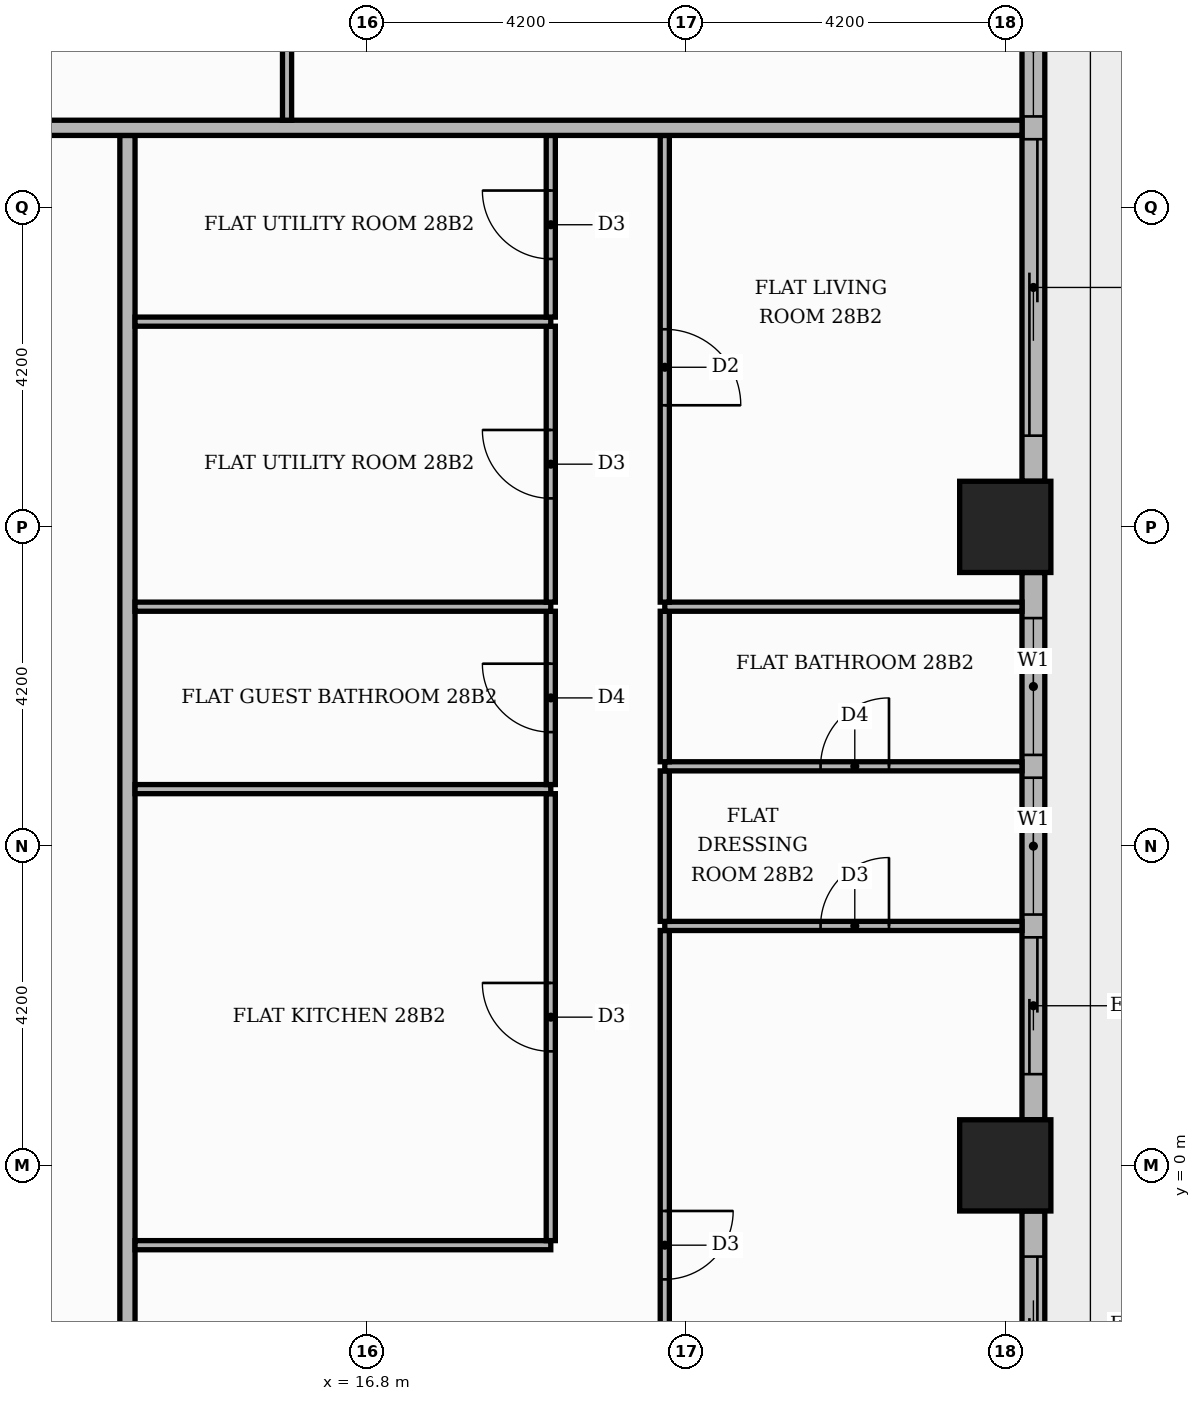
"""IFC4 building model, lengths in metres.
Left out: names, types, materials, properties, quantities, classifications, styles, units other than length and angle.
Written with IfcOpenShell. Run it as: python <this file> out.ifc"""

import sys

from ifc_helpers import new_model, si_unit, direction, frame, frame_2d, origin, origin_2d, place, context, subcontext, project, spatial, rectangle, extrude, element, fill, save


model = new_model("IFC4")
c1 = context("Model", 3, precision=1e-05, world=origin(), true_north=direction((0.0, 1.0)))
c2 = subcontext(c1, "Body", "Model", "MODEL_VIEW")
j1 = project(units=[si_unit("LENGTHUNIT", "METRE"), si_unit("PLANEANGLEUNIT", "RADIAN")], contexts=[c1])
p1 = place(None, origin())
s1 = spatial("IfcSite", under=j1, at=p1, CompositionType="ELEMENT")
p2 = place(p1, origin())
s2 = spatial("IfcBuilding", under=s1, at=p2, CompositionType="ELEMENT")
p3 = place(p2, frame((0.0, 0.0, 118.2)))
s3 = spatial("IfcBuildingStorey", under=s2, at=p3, CompositionType="ELEMENT", Elevation=118.2)
for number, where, z_axis, x_axis in (
    (1, (25.2, 0.0, 0.0), (0.0, 0.0, 1.0), (1.0, 0.0, 0.0)),
    (2, (25.2, 8.4, 0.0), (0.0, 0.0, 1.0), (1.0, 0.0, 0.0)),
):
    element("IfcColumn", number, at=place(p3, frame(where, z_axis=z_axis, x_axis=x_axis)), inside=s3, PredefinedType="COLUMN", context=c2, shape_type="SweptSolid", body=[
        extrude(rectangle(XDim=1.2, YDim=1.2, at=origin_2d()), origin(), (0.0, 0.0, 1.0), 3.9),
    ])
p4 = place(p3, frame((25.57, -7.8, 0.0), z_axis=(0.0, 0.0, 1.0), x_axis=(0.0, 1.0, 0.0)))
e3 = element("IfcWall", 3, at=p4, inside=s3, PredefinedType="STANDARD", context=c2, shape_type="SweptSolid", body=[
    extrude(rectangle(XDim=7.2, YDim=0.3, at=frame_2d((3.6, 0.0))), origin(), (0.0, 0.0, 1.0), 3.48),
])
p5 = place(p4, frame((0.6, 0.0, 0.9)))
e4 = element("IfcOpeningElement", 4, at=p5, cuts=e3, PredefinedType="OPENING", context=c2, shape_type="SweptSolid", body=[
    extrude(rectangle(XDim=1.8, YDim=2.1, at=frame_2d((0.9, 1.05))), frame((0.0, 0.16, 0.0), z_axis=(0.0, -1.0, 0.0), x_axis=(1.0, 0.0, 0.0)), (0.0, 0.0, 1.0), 0.32),
])
p6 = place(p4, frame((2.7, 0.0, 0.9)))
e5 = element("IfcOpeningElement", 5, at=p6, cuts=e3, PredefinedType="OPENING", context=c2, shape_type="SweptSolid", body=[
    extrude(rectangle(XDim=1.8, YDim=2.1, at=frame_2d((0.9, 1.05))), frame((0.0, 0.16, 0.0), z_axis=(0.0, -1.0, 0.0), x_axis=(1.0, 0.0, 0.0)), (0.0, 0.0, 1.0), 0.32),
])
p7 = place(p4, frame((4.8, 0.0, 0.0)))
e6 = element("IfcOpeningElement", 6, at=p7, cuts=e3, PredefinedType="OPENING", context=c2, shape_type="SweptSolid", body=[
    extrude(rectangle(XDim=1.8, YDim=2.4, at=frame_2d((0.9, 1.2))), frame((0.0, 0.16, 0.0), z_axis=(0.0, -1.0, 0.0), x_axis=(1.0, 0.0, 0.0)), (0.0, 0.0, 1.0), 0.32),
])
p8 = place(p3, frame((25.57, 0.6, 0.0), z_axis=(0.0, 0.0, 1.0), x_axis=(0.0, 1.0, 0.0)))
e7 = element("IfcWall", 7, at=p8, inside=s3, PredefinedType="STANDARD", context=c2, shape_type="SweptSolid", body=[
    extrude(rectangle(XDim=7.2, YDim=0.3, at=frame_2d((3.6, 0.0))), origin(), (0.0, 0.0, 1.0), 3.48),
])
p9 = place(p8, frame((0.6, 0.0, 0.0)))
e8 = element("IfcOpeningElement", 8, at=p9, cuts=e7, PredefinedType="OPENING", context=c2, shape_type="SweptSolid", body=[
    extrude(rectangle(XDim=1.8, YDim=2.4, at=frame_2d((0.9, 1.2))), frame((0.0, 0.16, 0.0), z_axis=(0.0, -1.0, 0.0), x_axis=(1.0, 0.0, 0.0)), (0.0, 0.0, 1.0), 0.32),
])
p10 = place(p8, frame((2.7, 0.0, 0.9)))
e9 = element("IfcOpeningElement", 9, at=p10, cuts=e7, PredefinedType="OPENING", context=c2, shape_type="SweptSolid", body=[
    extrude(rectangle(XDim=1.8, YDim=2.1, at=frame_2d((0.9, 1.05))), frame((0.0, 0.16, 0.0), z_axis=(0.0, -1.0, 0.0), x_axis=(1.0, 0.0, 0.0)), (0.0, 0.0, 1.0), 0.32),
])
p11 = place(p8, frame((4.8, 0.0, 0.9)))
e10 = element("IfcOpeningElement", 10, at=p11, cuts=e7, PredefinedType="OPENING", context=c2, shape_type="SweptSolid", body=[
    extrude(rectangle(XDim=1.8, YDim=2.1, at=frame_2d((0.9, 1.05))), frame((0.0, 0.16, 0.0), z_axis=(0.0, -1.0, 0.0), x_axis=(1.0, 0.0, 0.0)), (0.0, 0.0, 1.0), 0.32),
])
p12 = place(p3, frame((25.57, 9.0, 0.0), z_axis=(0.0, 0.0, 1.0), x_axis=(0.0, 1.0, 0.0)))
e11 = element("IfcWall", 11, at=p12, inside=s3, PredefinedType="STANDARD", context=c2, shape_type="SweptSolid", body=[
    extrude(rectangle(XDim=7.2, YDim=0.3, at=frame_2d((3.6, 0.0))), origin(), (0.0, 0.0, 1.0), 3.48),
])
p13 = place(p12, frame((0.6, 0.0, 0.0)))
e12 = element("IfcOpeningElement", 12, at=p13, cuts=e11, PredefinedType="OPENING", context=c2, shape_type="SweptSolid", body=[
    extrude(rectangle(XDim=3.9, YDim=2.4, at=frame_2d((1.95, 1.2))), frame((0.0, 0.16, 0.0), z_axis=(0.0, -1.0, 0.0), x_axis=(1.0, 0.0, 0.0)), (0.0, 0.0, 1.0), 0.32),
])
p14 = place(p12, frame((4.8, 0.0, 0.9)))
e13 = element("IfcOpeningElement", 13, at=p14, cuts=e11, PredefinedType="OPENING", context=c2, shape_type="SweptSolid", body=[
    extrude(rectangle(XDim=1.8, YDim=2.1, at=frame_2d((0.9, 1.05))), frame((0.0, 0.16, 0.0), z_axis=(0.0, -1.0, 0.0), x_axis=(1.0, 0.0, 0.0)), (0.0, 0.0, 1.0), 0.32),
])
p15 = place(p3, frame((13.65, -5.15, 0.0), z_axis=(0.0, 0.0, 1.0), x_axis=(0.0, 1.0, 0.0)))
e14 = element("IfcWall", 14, at=p15, inside=s3, PredefinedType="PARTITIONING", context=c2, shape_type="SweptSolid", body=[
    extrude(rectangle(XDim=18.7, YDim=0.2, at=frame_2d((9.35, 0.0))), origin(), (0.0, 0.0, 1.0), 3.48),
])
p16 = place(p15, frame((1.45, 0.0, 0.0)))
e15 = element("IfcOpeningElement", 15, at=p16, cuts=e14, PredefinedType="OPENING", context=c2, shape_type="SweptSolid", body=[
    extrude(rectangle(XDim=1.1, YDim=2.4, at=frame_2d((0.55, 1.2))), frame((0.0, 0.11, 0.0), z_axis=(0.0, -1.0, 0.0), x_axis=(1.0, 0.0, 0.0)), (0.0, 0.0, 1.0), 0.22),
])
p17 = place(p3, frame((20.72, -5.15, 0.0), z_axis=(0.0, 0.0, 1.0), x_axis=(0.0, 1.0, 0.0)))
e16 = element("IfcWall", 16, at=p17, inside=s3, PredefinedType="PARTITIONING", context=c2, shape_type="SweptSolid", body=[
    extrude(rectangle(XDim=8.24, YDim=0.12, at=frame_2d((4.12, 0.0))), origin(), (0.0, 0.0, 1.0), 3.48),
])
p18 = place(p17, frame((3.65, 0.0, 0.0)))
e17 = element("IfcOpeningElement", 17, at=p18, cuts=e16, PredefinedType="OPENING", context=c2, shape_type="SweptSolid", body=[
    extrude(rectangle(XDim=0.9, YDim=2.1, at=frame_2d((0.45, 1.05))), frame((0.0, 0.07, 0.0), z_axis=(0.0, -1.0, 0.0), x_axis=(1.0, 0.0, 0.0)), (0.0, 0.0, 1.0), 0.14),
])
p19 = place(p3, frame((13.75, -1.05, 0.0), z_axis=(0.0, 0.0, 1.0), x_axis=(1.0, 0.0, 0.0)))
e18 = element("IfcWall", 18, at=p19, inside=s3, PredefinedType="PARTITIONING", context=c2, shape_type="SweptSolid", body=[
    extrude(rectangle(XDim=5.47, YDim=0.12, at=frame_2d((2.735, 0.0))), origin(), (0.0, 0.0, 1.0), 3.48),
])
p20 = place(p3, frame((19.22, -0.99, 0.0), z_axis=(0.0, 0.0, 1.0), x_axis=(0.0, 1.0, 0.0)))
e19 = element("IfcWall", 19, at=p20, inside=s3, PredefinedType="PARTITIONING", context=c2, shape_type="SweptSolid", body=[
    extrude(rectangle(XDim=5.88, YDim=0.12, at=frame_2d((2.94, 0.0))), origin(), (0.0, 0.0, 1.0), 3.48),
])
p21 = place(p20, frame((2.49, 0.0, 0.0)))
e20 = element("IfcOpeningElement", 20, at=p21, cuts=e19, PredefinedType="OPENING", context=c2, shape_type="SweptSolid", body=[
    extrude(rectangle(XDim=0.9, YDim=2.1, at=frame_2d((0.45, 1.05))), frame((0.0, 0.07, 0.0), z_axis=(0.0, -1.0, 0.0), x_axis=(1.0, 0.0, 0.0)), (0.0, 0.0, 1.0), 0.14),
])
p22 = place(p3, frame((20.72, 3.15, 0.0), z_axis=(0.0, 0.0, 1.0), x_axis=(1.0, 0.0, 0.0)))
e21 = element("IfcWall", 21, at=p22, inside=s3, PredefinedType="PARTITIONING", context=c2, shape_type="SweptSolid", body=[
    extrude(rectangle(XDim=4.7, YDim=0.12, at=frame_2d((2.35, 0.0))), origin(), (0.0, 0.0, 1.0), 3.48),
])
p23 = place(p22, frame((2.05, 0.0, 0.0)))
e22 = element("IfcOpeningElement", 22, at=p23, cuts=e21, PredefinedType="OPENING", context=c2, shape_type="SweptSolid", body=[
    extrude(rectangle(XDim=0.9, YDim=2.1, at=frame_2d((0.45, 1.05))), frame((0.0, 0.07, 0.0), z_axis=(0.0, -1.0, 0.0), x_axis=(1.0, 0.0, 0.0)), (0.0, 0.0, 1.0), 0.14),
])
p24 = place(p3, frame((20.72, 3.21, 0.0), z_axis=(0.0, 0.0, 1.0), x_axis=(0.0, 1.0, 0.0)))
e23 = element("IfcWall", 23, at=p24, inside=s3, PredefinedType="PARTITIONING", context=c2, shape_type="SweptSolid", body=[
    extrude(rectangle(XDim=1.98, YDim=0.12, at=frame_2d((0.99, 0.0))), origin(), (0.0, 0.0, 1.0), 3.48),
])
p25 = place(p3, frame((13.75, 4.95, 0.0), z_axis=(0.0, 0.0, 1.0), x_axis=(1.0, 0.0, 0.0)))
e24 = element("IfcWall", 24, at=p25, inside=s3, PredefinedType="PARTITIONING", context=c2, shape_type="SweptSolid", body=[
    extrude(rectangle(XDim=5.47, YDim=0.12, at=frame_2d((2.735, 0.0))), origin(), (0.0, 0.0, 1.0), 3.48),
])
p26 = place(p3, frame((19.22, 5.01, 0.0), z_axis=(0.0, 0.0, 1.0), x_axis=(0.0, 1.0, 0.0)))
e25 = element("IfcWall", 25, at=p26, inside=s3, PredefinedType="PARTITIONING", context=c2, shape_type="SweptSolid", body=[
    extrude(rectangle(XDim=2.28, YDim=0.12, at=frame_2d((1.14, 0.0))), origin(), (0.0, 0.0, 1.0), 3.48),
])
p27 = place(p26, frame((0.69, 0.0, 0.0)))
e26 = element("IfcOpeningElement", 26, at=p27, cuts=e25, PredefinedType="OPENING", context=c2, shape_type="SweptSolid", body=[
    extrude(rectangle(XDim=0.9, YDim=2.1, at=frame_2d((0.45, 1.05))), frame((0.0, 0.07, 0.0), z_axis=(0.0, -1.0, 0.0), x_axis=(1.0, 0.0, 0.0)), (0.0, 0.0, 1.0), 0.14),
])
p28 = place(p3, frame((20.72, 5.25, 0.0), z_axis=(0.0, 0.0, 1.0), x_axis=(1.0, 0.0, 0.0)))
e27 = element("IfcWall", 27, at=p28, inside=s3, PredefinedType="PARTITIONING", context=c2, shape_type="SweptSolid", body=[
    extrude(rectangle(XDim=4.7, YDim=0.12, at=frame_2d((2.35, 0.0))), origin(), (0.0, 0.0, 1.0), 3.48),
])
p29 = place(p28, frame((2.05, 0.0, 0.0)))
e28 = element("IfcOpeningElement", 28, at=p29, cuts=e27, PredefinedType="OPENING", context=c2, shape_type="SweptSolid", body=[
    extrude(rectangle(XDim=0.9, YDim=2.1, at=frame_2d((0.45, 1.05))), frame((0.0, 0.07, 0.0), z_axis=(0.0, -1.0, 0.0), x_axis=(1.0, 0.0, 0.0)), (0.0, 0.0, 1.0), 0.14),
])
p30 = place(p3, frame((20.72, 5.31, 0.0), z_axis=(0.0, 0.0, 1.0), x_axis=(0.0, 1.0, 0.0)))
e29 = element("IfcWall", 29, at=p30, inside=s3, PredefinedType="PARTITIONING", context=c2, shape_type="SweptSolid", body=[
    extrude(rectangle(XDim=1.98, YDim=0.12, at=frame_2d((0.99, 0.0))), origin(), (0.0, 0.0, 1.0), 3.48),
])
p31 = place(p3, frame((13.75, 7.35, 0.0), z_axis=(0.0, 0.0, 1.0), x_axis=(1.0, 0.0, 0.0)))
e30 = element("IfcWall", 30, at=p31, inside=s3, PredefinedType="PARTITIONING", context=c2, shape_type="SweptSolid", body=[
    extrude(rectangle(XDim=5.47, YDim=0.12, at=frame_2d((2.735, 0.0))), origin(), (0.0, 0.0, 1.0), 3.48),
])
p32 = place(p3, frame((20.72, 7.35, 0.0), z_axis=(0.0, 0.0, 1.0), x_axis=(1.0, 0.0, 0.0)))
e31 = element("IfcWall", 31, at=p32, inside=s3, PredefinedType="PARTITIONING", context=c2, shape_type="SweptSolid", body=[
    extrude(rectangle(XDim=4.7, YDim=0.12, at=frame_2d((2.35, 0.0))), origin(), (0.0, 0.0, 1.0), 3.48),
])
p33 = place(p3, frame((19.22, 7.41, 0.0), z_axis=(0.0, 0.0, 1.0), x_axis=(0.0, 1.0, 0.0)))
e32 = element("IfcWall", 32, at=p33, inside=s3, PredefinedType="PARTITIONING", context=c2, shape_type="SweptSolid", body=[
    extrude(rectangle(XDim=3.63, YDim=0.12, at=frame_2d((1.815, 0.0))), origin(), (0.0, 0.0, 1.0), 3.48),
])
p34 = place(p33, frame((1.365, 0.0, 0.0)))
e33 = element("IfcOpeningElement", 33, at=p34, cuts=e32, PredefinedType="OPENING", context=c2, shape_type="SweptSolid", body=[
    extrude(rectangle(XDim=0.9, YDim=2.1, at=frame_2d((0.45, 1.05))), frame((0.0, 0.07, 0.0), z_axis=(0.0, -1.0, 0.0), x_axis=(1.0, 0.0, 0.0)), (0.0, 0.0, 1.0), 0.14),
])
p35 = place(p3, frame((20.72, 7.41, 0.0), z_axis=(0.0, 0.0, 1.0), x_axis=(0.0, 1.0, 0.0)))
e34 = element("IfcWall", 34, at=p35, inside=s3, PredefinedType="PARTITIONING", context=c2, shape_type="SweptSolid", body=[
    extrude(rectangle(XDim=6.14, YDim=0.12, at=frame_2d((3.07, 0.0))), origin(), (0.0, 0.0, 1.0), 3.48),
])
p36 = place(p35, frame((2.59, 0.0, 0.0)))
e35 = element("IfcOpeningElement", 35, at=p36, cuts=e34, PredefinedType="OPENING", context=c2, shape_type="SweptSolid", body=[
    extrude(rectangle(XDim=1.0, YDim=2.1, at=frame_2d((0.5, 1.05))), frame((0.0, 0.07, 0.0), z_axis=(0.0, -1.0, 0.0), x_axis=(1.0, 0.0, 0.0)), (0.0, 0.0, 1.0), 0.14),
])
p37 = place(p3, frame((13.75, 11.1, 0.0), z_axis=(0.0, 0.0, 1.0), x_axis=(1.0, 0.0, 0.0)))
e36 = element("IfcWall", 36, at=p37, inside=s3, PredefinedType="PARTITIONING", context=c2, shape_type="SweptSolid", body=[
    extrude(rectangle(XDim=5.47, YDim=0.12, at=frame_2d((2.735, 0.0))), origin(), (0.0, 0.0, 1.0), 3.48),
])
p38 = place(p3, frame((19.22, 11.16, 0.0), z_axis=(0.0, 0.0, 1.0), x_axis=(0.0, 1.0, 0.0)))
e37 = element("IfcWall", 37, at=p38, inside=s3, PredefinedType="PARTITIONING", context=c2, shape_type="SweptSolid", body=[
    extrude(rectangle(XDim=2.39, YDim=0.12, at=frame_2d((1.195, 0.0))), origin(), (0.0, 0.0, 1.0), 3.48),
])
p39 = place(p38, frame((0.765, 0.0, 0.0)))
e38 = element("IfcOpeningElement", 38, at=p39, cuts=e37, PredefinedType="OPENING", context=c2, shape_type="SweptSolid", body=[
    extrude(rectangle(XDim=0.9, YDim=2.1, at=frame_2d((0.45, 1.05))), frame((0.0, 0.07, 0.0), z_axis=(0.0, -1.0, 0.0), x_axis=(1.0, 0.0, 0.0)), (0.0, 0.0, 1.0), 0.14),
])
p40 = place(p3, frame((-13.65, 13.65, 0.0), z_axis=(0.0, 0.0, 1.0), x_axis=(1.0, 0.0, 0.0)))
e39 = element("IfcWall", 39, at=p40, inside=s3, PredefinedType="PARTITIONING", context=c2, shape_type="SweptSolid", body=[
    extrude(rectangle(XDim=39.07, YDim=0.2, at=frame_2d((19.535, 0.0))), origin(), (0.0, 0.0, 1.0), 3.48),
])
p41 = place(p40, frame((24.65, 0.0, 0.0)))
e40 = element("IfcOpeningElement", 40, at=p41, cuts=e39, PredefinedType="OPENING", context=c2, shape_type="SweptSolid", body=[
    extrude(rectangle(XDim=1.1, YDim=2.4, at=frame_2d((0.55, 1.2))), frame((0.0, 0.11, 0.0), z_axis=(0.0, -1.0, 0.0), x_axis=(1.0, 0.0, 0.0)), (0.0, 0.0, 1.0), 0.22),
])
p42 = place(p40, frame((14.15, 0.0, 0.0)))
e41 = element("IfcOpeningElement", 41, at=p42, cuts=e39, PredefinedType="OPENING", context=c2, shape_type="SweptSolid", body=[
    extrude(rectangle(XDim=1.1, YDim=2.4, at=frame_2d((0.55, 1.2))), frame((0.0, 0.11, 0.0), z_axis=(0.0, -1.0, 0.0), x_axis=(1.0, 0.0, 0.0)), (0.0, 0.0, 1.0), 0.22),
])
p43 = place(p3, frame((15.75, 13.75, 0.0), z_axis=(0.0, 0.0, 1.0), x_axis=(0.0, 1.0, 0.0)))
e42 = element("IfcWall", 42, at=p43, inside=s3, PredefinedType="PARTITIONING", context=c2, shape_type="SweptSolid", body=[
    extrude(rectangle(XDim=6.01, YDim=0.12, at=frame_2d((3.005, 0.0))), origin(), (0.0, 0.0, 1.0), 3.48),
])
p44 = place(p43, frame((2.485, 0.0, 0.0)))
e43 = element("IfcOpeningElement", 43, at=p44, cuts=e42, PredefinedType="OPENING", context=c2, shape_type="SweptSolid", body=[
    extrude(rectangle(XDim=1.0, YDim=2.1, at=frame_2d((0.5, 1.05))), frame((0.0, 0.07, 0.0), z_axis=(0.0, -1.0, 0.0), x_axis=(1.0, 0.0, 0.0)), (0.0, 0.0, 1.0), 0.14),
])
p45 = place(p7, origin())
e44 = element("IfcDoor", 44, at=p45, inside=s3, OperationType="SLIDING_TO_RIGHT", PredefinedType="DOOR", context=c2, shape_type="SweptSolid", body=[
    extrude(rectangle(XDim=1.8, YDim=2.4, at=frame_2d((0.9, 1.2))), frame((0.0, 0.025, 0.0), z_axis=(0.0, -1.0, 0.0), x_axis=(1.0, 0.0, 0.0)), (0.0, 0.0, 1.0), 0.05),
])
fill(e6, e44)
p46 = place(p9, origin())
e45 = element("IfcDoor", 45, at=p46, inside=s3, OperationType="SLIDING_TO_LEFT", PredefinedType="DOOR", context=c2, shape_type="SweptSolid", body=[
    extrude(rectangle(XDim=1.8, YDim=2.4, at=frame_2d((0.9, 1.2))), frame((0.0, 0.025, 0.0), z_axis=(0.0, -1.0, 0.0), x_axis=(1.0, 0.0, 0.0)), (0.0, 0.0, 1.0), 0.05),
])
fill(e8, e45)
p47 = place(p10, origin())
e46 = element("IfcWindow", 46, at=p47, inside=s3, PartitioningType="SINGLE_PANEL", PredefinedType="WINDOW", context=c2, shape_type="SweptSolid", body=[
    extrude(rectangle(XDim=1.8, YDim=2.1, at=frame_2d((0.9, 1.05))), frame((0.0, 0.03, 0.0), z_axis=(0.0, -1.0, 0.0), x_axis=(1.0, 0.0, 0.0)), (0.0, 0.0, 1.0), 0.06),
])
fill(e9, e46)
p48 = place(p11, origin())
e47 = element("IfcWindow", 47, at=p48, inside=s3, PartitioningType="SINGLE_PANEL", PredefinedType="WINDOW", context=c2, shape_type="SweptSolid", body=[
    extrude(rectangle(XDim=1.8, YDim=2.1, at=frame_2d((0.9, 1.05))), frame((0.0, 0.03, 0.0), z_axis=(0.0, -1.0, 0.0), x_axis=(1.0, 0.0, 0.0)), (0.0, 0.0, 1.0), 0.06),
])
fill(e10, e47)
p49 = place(p13, origin())
e48 = element("IfcDoor", 48, at=p49, inside=s3, OperationType="SLIDING_TO_LEFT", PredefinedType="DOOR", context=c2, shape_type="SweptSolid", body=[
    extrude(rectangle(XDim=3.9, YDim=2.4, at=frame_2d((1.95, 1.2))), frame((0.0, 0.025, 0.0), z_axis=(0.0, -1.0, 0.0), x_axis=(1.0, 0.0, 0.0)), (0.0, 0.0, 1.0), 0.05),
])
fill(e12, e48)
p50 = place(p14, origin())
e49 = element("IfcWindow", 49, at=p50, inside=s3, PartitioningType="SINGLE_PANEL", PredefinedType="WINDOW", context=c2, shape_type="SweptSolid", body=[
    extrude(rectangle(XDim=1.8, YDim=2.1, at=frame_2d((0.9, 1.05))), frame((0.0, 0.03, 0.0), z_axis=(0.0, -1.0, 0.0), x_axis=(1.0, 0.0, 0.0)), (0.0, 0.0, 1.0), 0.06),
])
fill(e13, e49)
p51 = place(p21, origin())
e50 = element("IfcDoor", 50, at=p51, inside=s3, OperationType="SINGLE_SWING_RIGHT", PredefinedType="DOOR", context=c2, shape_type="SweptSolid", body=[
    extrude(rectangle(XDim=0.9, YDim=2.1, at=frame_2d((0.45, 1.05))), frame((0.0, 0.025, 0.0), z_axis=(0.0, -1.0, 0.0), x_axis=(1.0, 0.0, 0.0)), (0.0, 0.0, 1.0), 0.05),
])
fill(e20, e50)
p52 = place(p27, origin())
e51 = element("IfcDoor", 51, at=p52, inside=s3, OperationType="SINGLE_SWING_RIGHT", PredefinedType="DOOR", context=c2, shape_type="SweptSolid", body=[
    extrude(rectangle(XDim=0.9, YDim=2.1, at=frame_2d((0.45, 1.05))), frame((0.0, 0.025, 0.0), z_axis=(0.0, -1.0, 0.0), x_axis=(1.0, 0.0, 0.0)), (0.0, 0.0, 1.0), 0.05),
])
fill(e26, e51)
p53 = place(p34, origin())
e52 = element("IfcDoor", 52, at=p53, inside=s3, OperationType="SINGLE_SWING_RIGHT", PredefinedType="DOOR", context=c2, shape_type="SweptSolid", body=[
    extrude(rectangle(XDim=0.9, YDim=2.1, at=frame_2d((0.45, 1.05))), frame((0.0, 0.025, 0.0), z_axis=(0.0, -1.0, 0.0), x_axis=(1.0, 0.0, 0.0)), (0.0, 0.0, 1.0), 0.05),
])
fill(e33, e52)
p54 = place(p39, origin())
e53 = element("IfcDoor", 53, at=p54, inside=s3, OperationType="SINGLE_SWING_RIGHT", PredefinedType="DOOR", context=c2, shape_type="SweptSolid", body=[
    extrude(rectangle(XDim=0.9, YDim=2.1, at=frame_2d((0.45, 1.05))), frame((0.0, 0.025, 0.0), z_axis=(0.0, -1.0, 0.0), x_axis=(1.0, 0.0, 0.0)), (0.0, 0.0, 1.0), 0.05),
])
fill(e38, e53)
p55 = place(p18, frame((0.9, 0.0, 0.0), z_axis=(0.0, 0.0, 1.0), x_axis=(-1.0, 0.0, 0.0)))
e54 = element("IfcDoor", 54, at=p55, inside=s3, OperationType="SINGLE_SWING_RIGHT", PredefinedType="DOOR", context=c2, shape_type="SweptSolid", body=[
    extrude(rectangle(XDim=0.9, YDim=2.1, at=frame_2d((0.45, 1.05))), frame((0.0, 0.025, 0.0), z_axis=(0.0, -1.0, 0.0), x_axis=(1.0, 0.0, 0.0)), (0.0, 0.0, 1.0), 0.05),
])
fill(e17, e54)
p56 = place(p23, origin())
e55 = element("IfcDoor", 55, at=p56, inside=s3, OperationType="SINGLE_SWING_RIGHT", PredefinedType="DOOR", context=c2, shape_type="SweptSolid", body=[
    extrude(rectangle(XDim=0.9, YDim=2.1, at=frame_2d((0.45, 1.05))), frame((0.0, 0.025, 0.0), z_axis=(0.0, -1.0, 0.0), x_axis=(1.0, 0.0, 0.0)), (0.0, 0.0, 1.0), 0.05),
])
fill(e22, e55)
p57 = place(p29, origin())
e56 = element("IfcDoor", 56, at=p57, inside=s3, OperationType="SINGLE_SWING_RIGHT", PredefinedType="DOOR", context=c2, shape_type="SweptSolid", body=[
    extrude(rectangle(XDim=0.9, YDim=2.1, at=frame_2d((0.45, 1.05))), frame((0.0, 0.025, 0.0), z_axis=(0.0, -1.0, 0.0), x_axis=(1.0, 0.0, 0.0)), (0.0, 0.0, 1.0), 0.05),
])
fill(e28, e56)
p58 = place(p36, frame((1.0, 0.0, 0.0), z_axis=(0.0, 0.0, 1.0), x_axis=(-1.0, 0.0, 0.0)))
e57 = element("IfcDoor", 57, at=p58, inside=s3, OperationType="SINGLE_SWING_LEFT", PredefinedType="DOOR", context=c2, shape_type="SweptSolid", body=[
    extrude(rectangle(XDim=1.0, YDim=2.1, at=frame_2d((0.5, 1.05))), frame((0.0, 0.025, 0.0), z_axis=(0.0, -1.0, 0.0), x_axis=(1.0, 0.0, 0.0)), (0.0, 0.0, 1.0), 0.05),
])
fill(e35, e57)
save(model, sys.argv[1])
